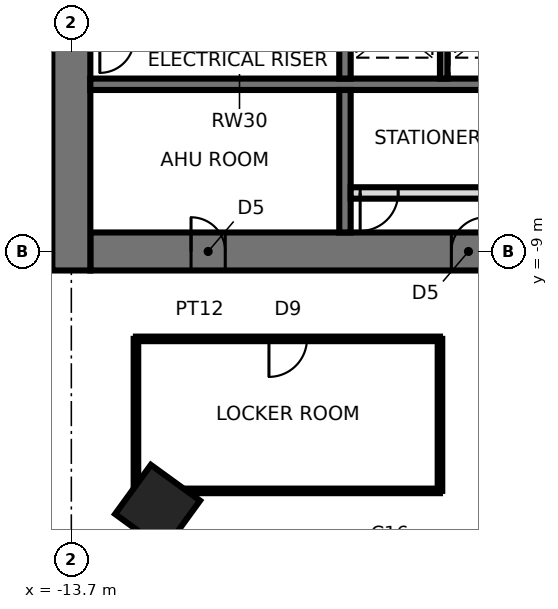
"""IFC4 building model, lengths in metres.
Left out: names, types, materials, properties, quantities, classifications, styles, units other than length and angle.
Written with IfcOpenShell. Run it as: python <this file> out.ifc"""

import sys

from ifc_helpers import new_model, si_unit, direction, frame, frame_2d, origin, origin_2d, place, context, subcontext, project, spatial, rectangle, extrude, element, fill, save


model = new_model("IFC4")
c1 = context("Model", 3, precision=1e-05, world=origin(), true_north=direction((0.0, 1.0)))
c2 = subcontext(c1, "Body", "Model", "MODEL_VIEW")
j1 = project(units=[si_unit("LENGTHUNIT", "METRE"), si_unit("PLANEANGLEUNIT", "RADIAN")], contexts=[c1])
p1 = place(None, origin())
s1 = spatial("IfcSite", under=j1, at=p1, CompositionType="ELEMENT")
p2 = place(p1, origin())
s2 = spatial("IfcBuilding", under=s1, at=p2, CompositionType="ELEMENT")
p3 = place(p2, frame((0.0, 0.0, 162.6)))
s3 = spatial("IfcBuildingStorey", under=s2, at=p3, CompositionType="ELEMENT", Elevation=162.6)
p4 = place(p3, frame((-11.43, -15.733, 0.0), z_axis=(0.0, 0.0, 1.0), x_axis=(-0.587785252292, -0.809016994375, 0.0)))
e1 = element("IfcColumn", 1, at=p4, inside=s3, PredefinedType="COLUMN", context=c2, shape_type="SweptSolid", body=[
    extrude(rectangle(XDim=1.6, YDim=1.6, at=origin_2d()), origin(), (0.0, 0.0, 1.0), 3.9),
])
p5 = place(p3, frame((-13.2, -9.0, 0.0), z_axis=(0.0, 0.0, 1.0), x_axis=(1.0, 0.0, 0.0)))
e2 = element("IfcWall", 2, at=p5, inside=s3, PredefinedType="SHEAR", context=c2, shape_type="SweptSolid", body=[
    extrude(rectangle(XDim=26.4, YDim=1.0, at=frame_2d((13.2, 0.0))), origin(), (0.0, 0.0, 1.0), 3.9),
])
p6 = place(p5, frame((2.65, 0.0, 0.0)))
e3 = element("IfcOpeningElement", 3, at=p6, cuts=e2, PredefinedType="OPENING", context=c2, shape_type="SweptSolid", body=[
    extrude(rectangle(XDim=0.9, YDim=2.1, at=frame_2d((0.45, 1.05))), frame((0.0, 0.51, 0.0), z_axis=(0.0, -1.0, 0.0), x_axis=(1.0, 0.0, 0.0)), (0.0, 0.0, 1.0), 1.02),
])
p7 = place(p5, frame((9.5, 0.0, 0.0)))
e4 = element("IfcOpeningElement", 4, at=p7, cuts=e2, PredefinedType="OPENING", context=c2, shape_type="SweptSolid", body=[
    extrude(rectangle(XDim=0.9, YDim=2.1, at=frame_2d((0.45, 1.05))), frame((0.0, 0.51, 0.0), z_axis=(0.0, -1.0, 0.0), x_axis=(1.0, 0.0, 0.0)), (0.0, 0.0, 1.0), 1.02),
])
p8 = place(p5, frame((16.0, 0.0, 0.0)))
e5 = element("IfcOpeningElement", 5, at=p8, cuts=e2, PredefinedType="OPENING", context=c2, shape_type="SweptSolid", body=[
    extrude(rectangle(XDim=0.9, YDim=2.1, at=frame_2d((0.45, 1.05))), frame((0.0, 0.51, 0.0), z_axis=(0.0, -1.0, 0.0), x_axis=(1.0, 0.0, 0.0)), (0.0, 0.0, 1.0), 1.02),
])
p9 = place(p5, frame((22.85, 0.0, 0.0)))
e6 = element("IfcOpeningElement", 6, at=p9, cuts=e2, PredefinedType="OPENING", context=c2, shape_type="SweptSolid", body=[
    extrude(rectangle(XDim=0.9, YDim=2.1, at=frame_2d((0.45, 1.05))), frame((0.0, 0.51, 0.0), z_axis=(0.0, -1.0, 0.0), x_axis=(1.0, 0.0, 0.0)), (0.0, 0.0, 1.0), 1.02),
])
p10 = place(p3, frame((-13.7, 9.5, 0.0), z_axis=(0.0, 0.0, 1.0), x_axis=(0.0, -1.0, 0.0)))
e7 = element("IfcWall", 7, at=p10, inside=s3, PredefinedType="SHEAR", context=c2, shape_type="SweptSolid", body=[
    extrude(rectangle(XDim=19.0, YDim=1.0, at=frame_2d((9.5, 0.0))), origin(), (0.0, 0.0, 1.0), 3.9),
])
p11 = place(p10, frame((8.6, 0.0, 0.0)))
e8 = element("IfcOpeningElement", 8, at=p11, cuts=e7, PredefinedType="OPENING", context=c2, shape_type="SweptSolid", body=[
    extrude(rectangle(XDim=1.8, YDim=2.4, at=frame_2d((0.9, 1.2))), frame((0.0, 0.51, 0.0), z_axis=(0.0, -1.0, 0.0), x_axis=(1.0, 0.0, 0.0)), (0.0, 0.0, 1.0), 1.02),
])
p12 = place(p3, frame((-13.2, -4.6, 0.0), z_axis=(0.0, 0.0, 1.0), x_axis=(1.0, 0.0, 0.0)))
e9 = element("IfcWall", 9, at=p12, inside=s3, PredefinedType="SHEAR", context=c2, shape_type="SweptSolid", body=[
    extrude(rectangle(XDim=26.4, YDim=0.3, at=frame_2d((13.2, 0.0))), origin(), (0.0, 0.0, 1.0), 3.9),
])
p13 = place(p3, frame((-6.5, -1.75, 0.0), z_axis=(0.0, 0.0, 1.0), x_axis=(0.0, -1.0, 0.0)))
e10 = element("IfcWall", 10, at=p13, inside=s3, PredefinedType="SHEAR", context=c2, shape_type="SweptSolid", body=[
    extrude(rectangle(XDim=2.7, YDim=0.3, at=frame_2d((1.35, 0.0))), origin(), (0.0, 0.0, 1.0), 3.9),
])
p14 = place(p3, frame((-6.5, -4.75, 0.0), z_axis=(0.0, 0.0, 1.0), x_axis=(0.0, -1.0, 0.0)))
e11 = element("IfcWall", 11, at=p14, inside=s3, PredefinedType="SHEAR", context=c2, shape_type="SweptSolid", body=[
    extrude(rectangle(XDim=3.75, YDim=0.3, at=frame_2d((1.875, 0.0))), origin(), (0.0, 0.0, 1.0), 3.9),
])
p15 = place(p3, frame((-3.9, -1.75, 0.0), z_axis=(0.0, 0.0, 1.0), x_axis=(0.0, -1.0, 0.0)))
e12 = element("IfcWall", 12, at=p15, inside=s3, PredefinedType="SHEAR", context=c2, shape_type="SweptSolid", body=[
    extrude(rectangle(XDim=2.7, YDim=0.2, at=frame_2d((1.35, 0.0))), origin(), (0.0, 0.0, 1.0), 3.9),
])
p16 = place(p3, frame((-6.35, -7.46, 0.0), z_axis=(0.0, 0.0, 1.0), x_axis=(1.0, 0.0, 0.0)))
e13 = element("IfcWall", 13, at=p16, inside=s3, PredefinedType="PARTITIONING", context=c2, shape_type="SweptSolid", body=[
    extrude(rectangle(XDim=6.2, YDim=0.3, at=frame_2d((3.1, 0.0))), origin(), (0.0, 0.0, 1.0), 3.7),
])
p17 = place(p16, frame((0.25, 0.0, 0.0)))
e14 = element("IfcOpeningElement", 14, at=p17, cuts=e13, PredefinedType="OPENING", context=c2, shape_type="SweptSolid", body=[
    extrude(rectangle(XDim=1.0, YDim=2.4, at=frame_2d((0.5, 1.2))), frame((0.0, 0.16, 0.0), z_axis=(0.0, -1.0, 0.0), x_axis=(1.0, 0.0, 0.0)), (0.0, 0.0, 1.0), 0.32),
])
p18 = place(p3, frame((-12.0, -15.3, 0.0), z_axis=(0.0, 0.0, 1.0), x_axis=(0.0, 1.0, 0.0)))
e15 = element("IfcWall", 15, at=p18, inside=s3, PredefinedType="PARTITIONING", context=c2, shape_type="SweptSolid", body=[
    extrude(rectangle(XDim=4.0, YDim=0.12, at=frame_2d((2.0, 0.0))), origin(), (0.0, 0.0, 1.0), 3.7),
])
p19 = place(p3, frame((-12.0, -11.3, 0.0), z_axis=(0.0, 0.0, 1.0), x_axis=(1.0, 0.0, 0.0)))
e16 = element("IfcWall", 16, at=p19, inside=s3, PredefinedType="PARTITIONING", context=c2, shape_type="SweptSolid", body=[
    extrude(rectangle(XDim=8.0, YDim=0.12, at=frame_2d((4.0, 0.0))), origin(), (0.0, 0.0, 1.0), 3.7),
])
p20 = place(p19, frame((3.5, 0.0, 0.0)))
e17 = element("IfcOpeningElement", 17, at=p20, cuts=e16, PredefinedType="OPENING", context=c2, shape_type="SweptSolid", body=[
    extrude(rectangle(XDim=1.0, YDim=2.4, at=frame_2d((0.5, 1.2))), frame((0.0, 0.07, 0.0), z_axis=(0.0, -1.0, 0.0), x_axis=(1.0, 0.0, 0.0)), (0.0, 0.0, 1.0), 0.14),
])
p21 = place(p3, frame((-4.0, -15.3, 0.0), z_axis=(0.0, 0.0, 1.0), x_axis=(-1.0, 0.0, 0.0)))
e18 = element("IfcWall", 18, at=p21, inside=s3, PredefinedType="PARTITIONING", context=c2, shape_type="SweptSolid", body=[
    extrude(rectangle(XDim=8.0, YDim=0.12, at=frame_2d((4.0, 0.0))), origin(), (0.0, 0.0, 1.0), 3.24),
])
p22 = place(p3, frame((-4.0, -11.3, 0.0), z_axis=(0.0, 0.0, 1.0), x_axis=(0.0, -1.0, 0.0)))
e19 = element("IfcWall", 19, at=p22, inside=s3, PredefinedType="PARTITIONING", context=c2, shape_type="SweptSolid", body=[
    extrude(rectangle(XDim=4.0, YDim=0.12, at=frame_2d((2.0, 0.0))), origin(), (0.0, 0.0, 1.0), 3.7),
])
p23 = place(p6, origin())
e20 = element("IfcDoor", 20, at=p23, inside=s3, OperationType="SINGLE_SWING_LEFT", PredefinedType="DOOR", context=c2, shape_type="SweptSolid", body=[
    extrude(rectangle(XDim=0.82, YDim=2.06, at=frame_2d((0.45, 1.03))), frame((0.0, 0.025, 0.0), z_axis=(0.0, -1.0, 0.0), x_axis=(1.0, 0.0, 0.0)), (0.0, 0.0, 1.0), 0.05),
    extrude(rectangle(XDim=0.04, YDim=2.1, at=frame_2d((0.02, 1.05))), frame((0.0, 0.25, 0.0), z_axis=(0.0, -1.0, 0.0), x_axis=(1.0, 0.0, 0.0)), (0.0, 0.0, 1.0), 0.5),
    extrude(rectangle(XDim=0.04, YDim=2.1, at=frame_2d((0.88, 1.05))), frame((0.0, 0.25, 0.0), z_axis=(0.0, -1.0, 0.0), x_axis=(1.0, 0.0, 0.0)), (0.0, 0.0, 1.0), 0.5),
    extrude(rectangle(XDim=0.82, YDim=0.04, at=frame_2d((0.45, 2.08))), frame((0.0, 0.25, 0.0), z_axis=(0.0, -1.0, 0.0), x_axis=(1.0, 0.0, 0.0)), (0.0, 0.0, 1.0), 0.5),
])
fill(e3, e20)
p24 = place(p7, origin())
e21 = element("IfcDoor", 21, at=p24, inside=s3, OperationType="SINGLE_SWING_RIGHT", PredefinedType="DOOR", context=c2, shape_type="SweptSolid", body=[
    extrude(rectangle(XDim=0.82, YDim=2.06, at=frame_2d((0.45, 1.03))), frame((0.0, 0.025, 0.0), z_axis=(0.0, -1.0, 0.0), x_axis=(1.0, 0.0, 0.0)), (0.0, 0.0, 1.0), 0.05),
    extrude(rectangle(XDim=0.04, YDim=2.1, at=frame_2d((0.02, 1.05))), frame((0.0, 0.25, 0.0), z_axis=(0.0, -1.0, 0.0), x_axis=(1.0, 0.0, 0.0)), (0.0, 0.0, 1.0), 0.5),
    extrude(rectangle(XDim=0.04, YDim=2.1, at=frame_2d((0.88, 1.05))), frame((0.0, 0.25, 0.0), z_axis=(0.0, -1.0, 0.0), x_axis=(1.0, 0.0, 0.0)), (0.0, 0.0, 1.0), 0.5),
    extrude(rectangle(XDim=0.82, YDim=0.04, at=frame_2d((0.45, 2.08))), frame((0.0, 0.25, 0.0), z_axis=(0.0, -1.0, 0.0), x_axis=(1.0, 0.0, 0.0)), (0.0, 0.0, 1.0), 0.5),
])
fill(e4, e21)
p25 = place(p17, frame((1.0, 0.0, 0.0), z_axis=(0.0, 0.0, 1.0), x_axis=(-1.0, 0.0, 0.0)))
e22 = element("IfcDoor", 22, at=p25, inside=s3, OperationType="SINGLE_SWING_RIGHT", PredefinedType="DOOR", context=c2, shape_type="SweptSolid", body=[
    extrude(rectangle(XDim=1.0, YDim=2.4, at=frame_2d((0.5, 1.2))), frame((0.0, 0.025, 0.0), z_axis=(0.0, -1.0, 0.0), x_axis=(1.0, 0.0, 0.0)), (0.0, 0.0, 1.0), 0.05),
])
fill(e14, e22)
p26 = place(p20, frame((1.0, 0.0, 0.0), z_axis=(0.0, 0.0, 1.0), x_axis=(-1.0, 0.0, 0.0)))
e23 = element("IfcDoor", 23, at=p26, inside=s3, OperationType="SINGLE_SWING_RIGHT", PredefinedType="DOOR", context=c2, shape_type="SweptSolid", body=[
    extrude(rectangle(XDim=1.0, YDim=2.4, at=frame_2d((0.5, 1.2))), frame((0.0, 0.025, 0.0), z_axis=(0.0, -1.0, 0.0), x_axis=(1.0, 0.0, 0.0)), (0.0, 0.0, 1.0), 0.05),
])
fill(e17, e23)
save(model, sys.argv[1])
